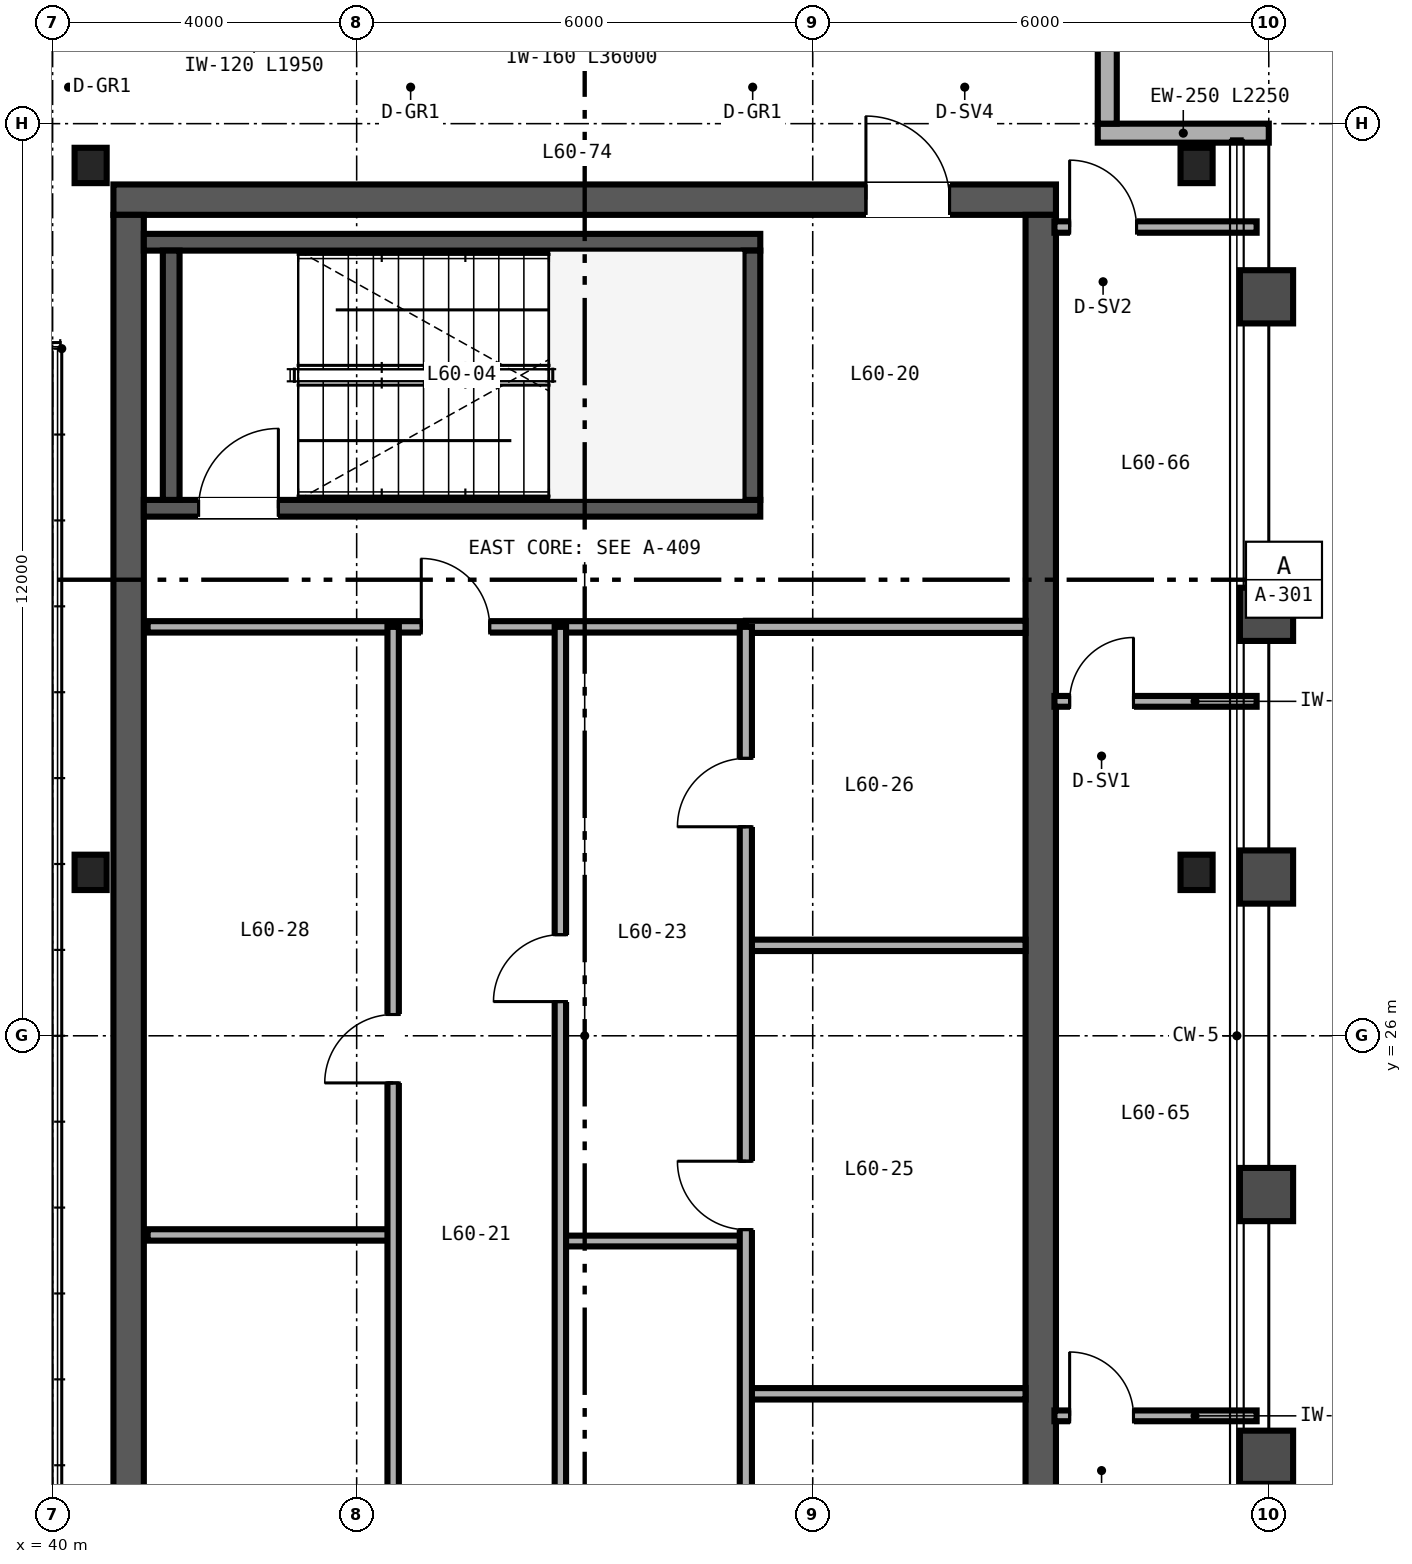
"""IFC4 building model, lengths in metres.
Left out: names, types, materials, properties, quantities, classifications, styles, units other than length and angle.
Written with IfcOpenShell. Run it as: python <this file> out.ifc"""

import sys

from ifc_helpers import new_model, si_unit, direction, frame, frame_2d, origin, origin_2d, place, context, subcontext, project, spatial, rectangle, i_section, extrude, source, transform, mapped, element, fill, save


model = new_model("IFC4")
c1 = context("Model", 3, precision=1e-05, world=origin(), true_north=direction((0.0, 1.0)))
c2 = subcontext(c1, "Body", "Model", "MODEL_VIEW")
j1 = project(units=[si_unit("LENGTHUNIT", "METRE"), si_unit("PLANEANGLEUNIT", "RADIAN")], contexts=[c1])
p1 = place(None, origin())
s1 = spatial("IfcSite", under=j1, at=p1, CompositionType="ELEMENT")
p2 = place(p1, origin())
s2 = spatial("IfcBuilding", under=s1, at=p2, CompositionType="ELEMENT")
p3 = place(p2, frame((0.0, 0.0, 240.0)))
s3 = spatial("IfcBuildingStorey", under=s2, at=p3, CompositionType="ELEMENT", Elevation=240.0)
p4 = place(p3, frame((40.8, 37.0, 0.0), z_axis=(0.0, 0.0, 1.0), x_axis=(1.0, 0.0, 0.0)))
e1 = element("IfcWall", 1, at=p4, inside=s3, PredefinedType="SHEAR", context=c2, shape_type="SweptSolid", body=[
    extrude(rectangle(XDim=12.4, YDim=0.4, at=frame_2d((6.2, 0.0))), origin(), (0.0, 0.0, 1.0), 3.38),
])
p5 = place(p4, frame((9.9, 0.0, 0.0)))
e2 = element("IfcOpeningElement", 2, at=p5, cuts=e1, PredefinedType="OPENING", context=c2, shape_type="SweptSolid", body=[
    extrude(rectangle(XDim=1.1, YDim=2.15, at=frame_2d((0.55, 1.075))), frame((0.0, 0.21, 0.0), z_axis=(0.0, -1.0, 0.0), x_axis=(1.0, 0.0, 0.0)), (0.0, 0.0, 1.0), 0.42),
])
for number, where, z_axis, x_axis in (
    (3, (41.0, 15.2, 0.0), (0.0, 0.0, 1.0), (0.0, 1.0, 0.0)),
    (4, (53.0, 15.2, 0.0), (0.0, 0.0, 1.0), (0.0, 1.0, 0.0)),
):
    element("IfcWall", number, at=place(p3, frame(where, z_axis=z_axis, x_axis=x_axis)), inside=s3, PredefinedType="SHEAR", context=c2, shape_type="SweptSolid", body=[
        extrude(rectangle(XDim=21.6, YDim=0.4, at=frame_2d((10.8, 0.0))), origin(), (0.0, 0.0, 1.0), 3.38),
    ])
p6 = place(p3, frame((41.2, 32.94, 0.0), z_axis=(0.0, 0.0, 1.0), x_axis=(1.0, 0.0, 0.0)))
e5 = element("IfcWall", 5, at=p6, inside=s3, PredefinedType="SHEAR", context=c2, shape_type="SweptSolid", body=[
    extrude(rectangle(XDim=8.11, YDim=0.22, at=frame_2d((4.055, 0.0))), origin(), (0.0, 0.0, 1.0), 3.4),
])
p7 = place(p6, frame((0.72, 0.0, 0.0)))
e6 = element("IfcOpeningElement", 6, at=p7, cuts=e5, PredefinedType="OPENING", context=c2, shape_type="SweptSolid", body=[
    extrude(rectangle(XDim=1.05, YDim=2.15, at=frame_2d((0.525, 1.075))), frame((0.0, 0.12, 0.0), z_axis=(0.0, -1.0, 0.0), x_axis=(1.0, 0.0, 0.0)), (0.0, 0.0, 1.0), 0.24),
])
p8 = place(p3, frame((41.2, 36.44, 0.0), z_axis=(0.0, 0.0, 1.0), x_axis=(1.0, 0.0, 0.0)))
e7 = element("IfcWall", 7, at=p8, inside=s3, PredefinedType="SHEAR", context=c2, shape_type="SweptSolid", body=[
    extrude(rectangle(XDim=8.11, YDim=0.22, at=frame_2d((4.055, 0.0))), origin(), (0.0, 0.0, 1.0), 3.4),
])
for number, where, z_axis, x_axis in (
    (8, (41.56, 33.05, 0.0), (0.0, 0.0, 1.0), (0.0, 1.0, 0.0)),
    (9, (49.2, 33.05, 0.0), (0.0, 0.0, 1.0), (0.0, 1.0, 0.0)),
):
    element("IfcWall", number, at=place(p3, frame(where, z_axis=z_axis, x_axis=x_axis)), inside=s3, PredefinedType="SHEAR", context=c2, shape_type="SweptSolid", body=[
        extrude(rectangle(XDim=3.28, YDim=0.22, at=frame_2d((1.64, 0.0))), origin(), (0.0, 0.0, 1.0), 3.4),
    ])
m1 = source(origin(), c2, "Body", "SweptSolid", [
    extrude(i_section(OverallWidth=0.422, OverallDepth=0.465, WebThickness=0.045, FlangeThickness=0.073, FilletRadius=0.025, at=origin_2d()), origin(), (0.0, 0.0, 1.0), 3.38),
])
for number, where, z_axis, x_axis in (
    (10, (40.5, 28.15, 0.0), (0.0, 0.0, 1.0), (1.0, 0.0, 0.0)),
    (11, (55.05, 28.15, 0.0), (0.0, 0.0, 1.0), (1.0, 0.0, 0.0)),
    (12, (40.5, 37.45, 0.0), (0.0, 0.0, 1.0), (1.0, 0.0, 0.0)),
    (13, (55.05, 37.45, 0.0), (0.0, 0.0, 1.0), (1.0, 0.0, 0.0)),
):
    element("IfcColumn", number, at=place(p3, frame(where, z_axis=z_axis, x_axis=x_axis)), inside=s3, PredefinedType="COLUMN", context=c2, shape_type="MappedRepresentation", body=[
        mapped(m1, transform((0.0, 0.0, 0.0), scale=1.0)),
    ])
p9 = place(p3, frame((56.0, 37.875, 0.0), z_axis=(0.0, 0.0, 1.0), x_axis=(-1.0, 0.0, 0.0)))
e14 = element("IfcWall", 14, at=p9, inside=s3, PredefinedType="SOLIDWALL", context=c2, shape_type="SweptSolid", body=[
    extrude(rectangle(XDim=2.25, YDim=0.25, at=frame_2d((1.125, 0.0))), origin(), (0.0, 0.0, 1.0), 3.38),
])
p10 = place(p3, frame((53.875, 38.0, 0.0), z_axis=(0.0, 0.0, 1.0), x_axis=(0.0, 1.0, 0.0)))
e15 = element("IfcWall", 15, at=p10, inside=s3, PredefinedType="SOLIDWALL", context=c2, shape_type="SweptSolid", body=[
    extrude(rectangle(XDim=2.0, YDim=0.25, at=frame_2d((1.0, 0.0))), origin(), (0.0, 0.0, 1.0), 3.38),
])
p11 = place(p3, frame((41.25, 31.38, 0.0), z_axis=(0.0, 0.0, 1.0), x_axis=(1.0, 0.0, 0.0)))
e16 = element("IfcWall", 16, at=p11, inside=s3, PredefinedType="PARTITIONING", context=c2, shape_type="SweptSolid", body=[
    extrude(rectangle(XDim=7.87, YDim=0.15, at=frame_2d((3.935, 0.0))), origin(), (0.0, 0.0, 1.0), 2.48),
])
p12 = place(p11, frame((3.6, 0.0, 0.0)))
e17 = element("IfcOpeningElement", 17, at=p12, cuts=e16, PredefinedType="OPENING", context=c2, shape_type="SweptSolid", body=[
    extrude(rectangle(XDim=0.9, YDim=2.15, at=frame_2d((0.45, 1.075))), frame((0.0, 0.085, 0.0), z_axis=(0.0, -1.0, 0.0), x_axis=(1.0, 0.0, 0.0)), (0.0, 0.0, 1.0), 0.17),
])
p13 = place(p3, frame((46.68, 23.3, 0.0), z_axis=(0.0, 0.0, 1.0), x_axis=(1.0, 0.0, 0.0)))
e18 = element("IfcWall", 18, at=p13, inside=s3, PredefinedType="PARTITIONING", context=c2, shape_type="SweptSolid", body=[
    extrude(rectangle(XDim=2.44, YDim=0.142, at=frame_2d((1.22, 0.0))), origin(), (0.0, 0.0, 1.0), 3.38),
])
p14 = place(p3, frame((46.68, 15.25, 0.0), z_axis=(0.0, 0.0, 1.0), x_axis=(0.0, 1.0, 0.0)))
e19 = element("IfcWall", 19, at=p14, inside=s3, PredefinedType="PARTITIONING", context=c2, shape_type="SweptSolid", body=[
    extrude(rectangle(XDim=16.13, YDim=0.15, at=frame_2d((8.065, 0.0))), origin(), (0.0, 0.0, 1.0), 2.453),
])
p15 = place(p14, frame((3.2, 0.0, 0.0)))
e20 = element("IfcOpeningElement", 20, at=p15, cuts=e19, PredefinedType="OPENING", context=c2, shape_type="SweptSolid", body=[
    extrude(rectangle(XDim=0.88, YDim=2.15, at=frame_2d((0.44, 1.075))), frame((0.0, 0.085, 0.0), z_axis=(0.0, -1.0, 0.0), x_axis=(1.0, 0.0, 0.0)), (0.0, 0.0, 1.0), 0.17),
])
p16 = place(p14, frame((11.2, 0.0, 0.0)))
e21 = element("IfcOpeningElement", 21, at=p16, cuts=e19, PredefinedType="OPENING", context=c2, shape_type="SweptSolid", body=[
    extrude(rectangle(XDim=0.88, YDim=2.15, at=frame_2d((0.44, 1.075))), frame((0.0, 0.085, 0.0), z_axis=(0.0, -1.0, 0.0), x_axis=(1.0, 0.0, 0.0)), (0.0, 0.0, 1.0), 0.17),
])
p17 = place(p3, frame((49.12, 31.38, 0.0), z_axis=(0.0, 0.0, 1.0), x_axis=(1.0, 0.0, 0.0)))
e22 = element("IfcWall", 22, at=p17, inside=s3, PredefinedType="PARTITIONING", context=c2, shape_type="SweptSolid", body=[
    extrude(rectangle(XDim=3.68, YDim=0.16, at=frame_2d((1.84, 0.0))), origin(), (0.0, 0.0, 1.0), 2.48),
])
for number, where, z_axis, x_axis in (
    (23, (49.12, 21.29, 0.0), (0.0, 0.0, 1.0), (1.0, 0.0, 0.0)),
    (24, (49.12, 27.19, 0.0), (0.0, 0.0, 1.0), (1.0, 0.0, 0.0)),
):
    element("IfcWall", number, at=place(p3, frame(where, z_axis=z_axis, x_axis=x_axis)), inside=s3, PredefinedType="PARTITIONING", context=c2, shape_type="SweptSolid", body=[
        extrude(rectangle(XDim=3.68, YDim=0.15, at=frame_2d((1.84, 0.0))), origin(), (0.0, 0.0, 1.0), 3.38),
    ])
p18 = place(p3, frame((49.12, 15.25, 0.0), z_axis=(0.0, 0.0, 1.0), x_axis=(0.0, 1.0, 0.0)))
e25 = element("IfcWall", 25, at=p18, inside=s3, PredefinedType="PARTITIONING", context=c2, shape_type="SweptSolid", body=[
    extrude(rectangle(XDim=16.13, YDim=0.16, at=frame_2d((8.065, 0.0))), origin(), (0.0, 0.0, 1.0), 2.453),
])
p19 = place(p18, frame((2.2, 0.0, 0.0)))
e26 = element("IfcOpeningElement", 26, at=p19, cuts=e25, PredefinedType="OPENING", context=c2, shape_type="SweptSolid", body=[
    extrude(rectangle(XDim=0.9, YDim=2.15, at=frame_2d((0.45, 1.075))), frame((0.0, 0.09, 0.0), z_axis=(0.0, -1.0, 0.0), x_axis=(1.0, 0.0, 0.0)), (0.0, 0.0, 1.0), 0.18),
])
p20 = place(p18, frame((8.2, 0.0, 0.0)))
e27 = element("IfcOpeningElement", 27, at=p20, cuts=e25, PredefinedType="OPENING", context=c2, shape_type="SweptSolid", body=[
    extrude(rectangle(XDim=0.9, YDim=2.15, at=frame_2d((0.45, 1.075))), frame((0.0, 0.09, 0.0), z_axis=(0.0, -1.0, 0.0), x_axis=(1.0, 0.0, 0.0)), (0.0, 0.0, 1.0), 0.18),
])
p21 = place(p18, frame((13.5, 0.0, 0.0)))
e28 = element("IfcOpeningElement", 28, at=p21, cuts=e25, PredefinedType="OPENING", context=c2, shape_type="SweptSolid", body=[
    extrude(rectangle(XDim=0.9, YDim=2.15, at=frame_2d((0.45, 1.075))), frame((0.0, 0.09, 0.0), z_axis=(0.0, -1.0, 0.0), x_axis=(1.0, 0.0, 0.0)), (0.0, 0.0, 1.0), 0.18),
])
p22 = place(p3, frame((41.25, 23.38, 0.0), z_axis=(0.0, 0.0, 1.0), x_axis=(1.0, 0.0, 0.0)))
e29 = element("IfcWall", 29, at=p22, inside=s3, PredefinedType="PARTITIONING", context=c2, shape_type="SweptSolid", body=[
    extrude(rectangle(XDim=3.23, YDim=0.15, at=frame_2d((1.615, 0.0))), origin(), (0.0, 0.0, 1.0), 3.38),
])
p23 = place(p3, frame((44.48, 15.25, 0.0), z_axis=(0.0, 0.0, 1.0), x_axis=(0.0, 1.0, 0.0)))
e30 = element("IfcWall", 30, at=p23, inside=s3, PredefinedType="PARTITIONING", context=c2, shape_type="SweptSolid", body=[
    extrude(rectangle(XDim=16.13, YDim=0.15, at=frame_2d((8.065, 0.0))), origin(), (0.0, 0.0, 1.0), 2.453),
])
p24 = place(p23, frame((2.2, 0.0, 0.0)))
e31 = element("IfcOpeningElement", 31, at=p24, cuts=e30, PredefinedType="OPENING", context=c2, shape_type="SweptSolid", body=[
    extrude(rectangle(XDim=0.9, YDim=2.15, at=frame_2d((0.45, 1.075))), frame((0.0, 0.085, 0.0), z_axis=(0.0, -1.0, 0.0), x_axis=(1.0, 0.0, 0.0)), (0.0, 0.0, 1.0), 0.17),
])
p25 = place(p23, frame((10.13, 0.0, 0.0)))
e32 = element("IfcOpeningElement", 32, at=p25, cuts=e30, PredefinedType="OPENING", context=c2, shape_type="SweptSolid", body=[
    extrude(rectangle(XDim=0.9, YDim=2.15, at=frame_2d((0.45, 1.075))), frame((0.0, 0.085, 0.0), z_axis=(0.0, -1.0, 0.0), x_axis=(1.0, 0.0, 0.0)), (0.0, 0.0, 1.0), 0.17),
])
p26 = place(p3, frame((53.18, 36.64, 0.0), z_axis=(0.0, 0.0, 1.0), x_axis=(1.0, 0.0, 0.0)))
e33 = element("IfcWall", 33, at=p26, inside=s3, PredefinedType="PARTITIONING", context=c2, shape_type="SweptSolid", body=[
    extrude(rectangle(XDim=2.66, YDim=0.15, at=frame_2d((1.33, 0.0))), origin(), (0.0, 0.0, 1.0), 2.763),
])
p27 = place(p26, frame((0.2, 0.0, 0.0)))
e34 = element("IfcOpeningElement", 34, at=p27, cuts=e33, PredefinedType="OPENING", context=c2, shape_type="SweptSolid", body=[
    extrude(rectangle(XDim=0.88, YDim=2.15, at=frame_2d((0.44, 1.075))), frame((0.0, 0.085, 0.0), z_axis=(0.0, -1.0, 0.0), x_axis=(1.0, 0.0, 0.0)), (0.0, 0.0, 1.0), 0.17),
])
p28 = place(p3, frame((53.18, 21.0, 0.0), z_axis=(0.0, 0.0, 1.0), x_axis=(1.0, 0.0, 0.0)))
e35 = element("IfcWall", 35, at=p28, inside=s3, PredefinedType="PARTITIONING", context=c2, shape_type="SweptSolid", body=[
    extrude(rectangle(XDim=2.66, YDim=0.142, at=frame_2d((1.33, 0.0))), origin(), (0.0, 0.0, 1.0), 2.601),
])
p29 = place(p28, frame((0.2, 0.0, 0.0)))
e36 = element("IfcOpeningElement", 36, at=p29, cuts=e35, PredefinedType="OPENING", context=c2, shape_type="SweptSolid", body=[
    extrude(rectangle(XDim=0.84, YDim=2.1, at=frame_2d((0.42, 1.05))), frame((0.0, 0.081, 0.0), z_axis=(0.0, -1.0, 0.0), x_axis=(1.0, 0.0, 0.0)), (0.0, 0.0, 1.0), 0.162),
])
p30 = place(p3, frame((53.18, 30.4, 0.0), z_axis=(0.0, 0.0, 1.0), x_axis=(1.0, 0.0, 0.0)))
e37 = element("IfcWall", 37, at=p30, inside=s3, PredefinedType="PARTITIONING", context=c2, shape_type="SweptSolid", body=[
    extrude(rectangle(XDim=2.66, YDim=0.142, at=frame_2d((1.33, 0.0))), origin(), (0.0, 0.0, 1.0), 2.763),
])
p31 = place(p30, frame((0.2, 0.0, 0.0)))
e38 = element("IfcOpeningElement", 38, at=p31, cuts=e37, PredefinedType="OPENING", context=c2, shape_type="SweptSolid", body=[
    extrude(rectangle(XDim=0.84, YDim=2.1, at=frame_2d((0.42, 1.05))), frame((0.0, 0.081, 0.0), z_axis=(0.0, -1.0, 0.0), x_axis=(1.0, 0.0, 0.0)), (0.0, 0.0, 1.0), 0.162),
])
m2 = source(origin(), c2, "Body", "SweptSolid", [
    extrude(rectangle(XDim=1.05, YDim=2.15, at=frame_2d((0.525, 1.075))), frame((0.0, 0.025, 0.0), z_axis=(0.0, -1.0, 0.0), x_axis=(1.0, 0.0, 0.0)), (0.0, 0.0, 1.0), 0.05),
])
p32 = place(p7, origin())
e39 = element("IfcDoor", 39, at=p32, inside=s3, OperationType="SINGLE_SWING_RIGHT", PredefinedType="DOOR", context=c2, shape_type="MappedRepresentation", body=[
    mapped(m2, transform((0.0, 0.0, 0.0), scale=1.0)),
])
fill(e6, e39)
m3 = source(origin(), c2, "Body", "SweptSolid", [
    extrude(rectangle(XDim=0.88, YDim=2.15, at=frame_2d((0.44, 1.075))), frame((0.0, 0.025, 0.0), z_axis=(0.0, -1.0, 0.0), x_axis=(1.0, 0.0, 0.0)), (0.0, 0.0, 1.0), 0.05),
])
p33 = place(p16, origin())
e40 = element("IfcDoor", 40, at=p33, inside=s3, OperationType="SINGLE_SWING_LEFT", PredefinedType="DOOR", context=c2, shape_type="MappedRepresentation", body=[
    mapped(m3, transform((0.0, 0.0, 0.0), scale=1.0)),
])
fill(e21, e40)
m4 = source(origin(), c2, "Body", "SweptSolid", [
    extrude(rectangle(XDim=0.9, YDim=2.15, at=frame_2d((0.45, 1.075))), frame((0.0, 0.025, 0.0), z_axis=(0.0, -1.0, 0.0), x_axis=(1.0, 0.0, 0.0)), (0.0, 0.0, 1.0), 0.05),
])
p34 = place(p12, origin())
e41 = element("IfcDoor", 41, at=p34, inside=s3, OperationType="SINGLE_SWING_LEFT", PredefinedType="DOOR", context=c2, shape_type="MappedRepresentation", body=[
    mapped(m4, transform((0.0, 0.0, 0.0), scale=1.0)),
])
fill(e17, e41)
m5 = source(origin(), c2, "Body", "SweptSolid", [
    extrude(rectangle(XDim=1.1, YDim=2.15, at=frame_2d((0.55, 1.075))), frame((0.0, 0.025, 0.0), z_axis=(0.0, -1.0, 0.0), x_axis=(1.0, 0.0, 0.0)), (0.0, 0.0, 1.0), 0.05),
])
p35 = place(p5, origin())
e42 = element("IfcDoor", 42, at=p35, inside=s3, OperationType="SINGLE_SWING_LEFT", PredefinedType="DOOR", context=c2, shape_type="MappedRepresentation", body=[
    mapped(m5, transform((0.0, 0.0, 0.0), scale=1.0)),
])
fill(e2, e42)
p36 = place(p20, origin())
e43 = element("IfcDoor", 43, at=p36, inside=s3, OperationType="SINGLE_SWING_RIGHT", PredefinedType="DOOR", context=c2, shape_type="MappedRepresentation", body=[
    mapped(m4, transform((0.0, 0.0, 0.0), scale=1.0)),
])
fill(e27, e43)
p37 = place(p21, origin())
e44 = element("IfcDoor", 44, at=p37, inside=s3, OperationType="SINGLE_SWING_LEFT", PredefinedType="DOOR", context=c2, shape_type="MappedRepresentation", body=[
    mapped(m4, transform((0.0, 0.0, 0.0), scale=1.0)),
])
fill(e28, e44)
p38 = place(p25, origin())
e45 = element("IfcDoor", 45, at=p38, inside=s3, OperationType="SINGLE_SWING_LEFT", PredefinedType="DOOR", context=c2, shape_type="MappedRepresentation", body=[
    mapped(m4, transform((0.0, 0.0, 0.0), scale=1.0)),
])
fill(e32, e45)
p39 = place(p27, origin())
e46 = element("IfcDoor", 46, at=p39, inside=s3, OperationType="SINGLE_SWING_LEFT", PredefinedType="DOOR", context=c2, shape_type="MappedRepresentation", body=[
    mapped(m3, transform((0.0, 0.0, 0.0), scale=1.0)),
])
fill(e34, e46)
m6 = source(origin(), c2, "Body", "SweptSolid", [
    extrude(rectangle(XDim=0.84, YDim=2.1, at=frame_2d((0.42, 1.05))), frame((0.0, 0.025, 0.0), z_axis=(0.0, -1.0, 0.0), x_axis=(1.0, 0.0, 0.0)), (0.0, 0.0, 1.0), 0.05),
])
p40 = place(p29, origin())
e47 = element("IfcDoor", 47, at=p40, inside=s3, OperationType="SINGLE_SWING_LEFT", PredefinedType="DOOR", context=c2, shape_type="MappedRepresentation", body=[
    mapped(m6, transform((0.0, 0.0, 0.0), scale=1.0)),
])
fill(e36, e47)
p41 = place(p31, origin())
e48 = element("IfcDoor", 48, at=p41, inside=s3, OperationType="SINGLE_SWING_RIGHT", PredefinedType="DOOR", context=c2, shape_type="MappedRepresentation", body=[
    mapped(m6, transform((0.0, 0.0, 0.0), scale=1.0)),
])
fill(e38, e48)
save(model, sys.argv[1])
